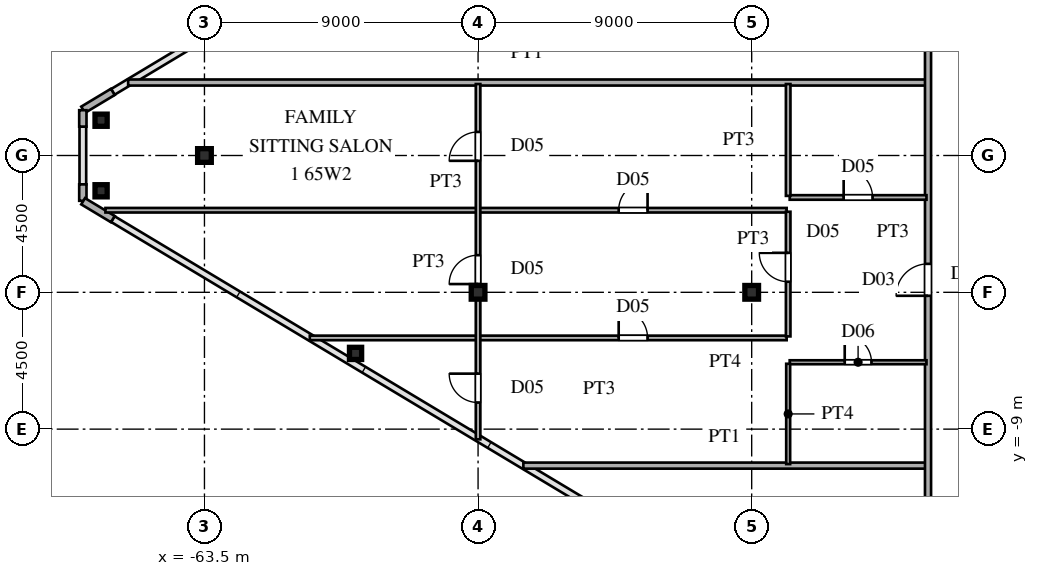
"""IFC4 building model, lengths in metres.
Left out: names, types, materials, properties, quantities, classifications, styles, units other than length and angle.
Written with IfcOpenShell. Run it as: python <this file> out.ifc"""

import sys

from ifc_helpers import new_model, si_unit, direction, frame, frame_2d, origin, origin_2d, place, context, subcontext, project, spatial, rectangle, hollow_rectangle, i_section, extrude, source, transform, mapped, element, fill, save


model = new_model("IFC4")
c1 = context("Model", 3, precision=1e-05, world=origin(), true_north=direction((0.0, 1.0)))
c2 = subcontext(c1, "Body", "Model", "MODEL_VIEW")
j1 = project(units=[si_unit("LENGTHUNIT", "METRE"), si_unit("PLANEANGLEUNIT", "RADIAN")], contexts=[c1])
p1 = place(None, origin())
s1 = spatial("IfcSite", under=j1, at=p1, CompositionType="ELEMENT")
p2 = place(p1, origin())
s2 = spatial("IfcBuilding", under=s1, at=p2, CompositionType="ELEMENT")
p3 = place(p2, frame((0.0, 0.0, 246.9)))
s3 = spatial("IfcBuildingStorey", under=s2, at=p3, CompositionType="ELEMENT", Elevation=246.9)
m1 = source(origin(), c2, "Body", "SweptSolid", [
    extrude(i_section(OverallWidth=0.45, OverallDepth=0.45, WebThickness=0.016, FlangeThickness=0.025, at=origin_2d()), origin(), (0.0, 0.0, 1.0), 3.75),
])
for number, where, z_axis, x_axis in (
    (1, (-45.5, -4.5, 0.0), (0.0, 0.0, 1.0), (1.0, 0.0, 0.0)),
    (2, (-54.5, -4.5, 0.0), (0.0, 0.0, 1.0), (1.0, 0.0, 0.0)),
    (3, (-63.5, 0.0, 0.0), (0.0, 0.0, 1.0), (1.0, 0.0, 0.0)),
):
    element("IfcColumn", number, at=place(p3, frame(where, z_axis=z_axis, x_axis=x_axis)), inside=s3, PredefinedType="COLUMN", context=c2, shape_type="MappedRepresentation", body=[
        mapped(m1, transform((0.0, 0.0, 0.0), scale=1.0)),
    ])
m2 = source(origin(), c2, "Body", "SweptSolid", [
    extrude(hollow_rectangle(XDim=0.4, YDim=0.4, WallThickness=0.016, at=origin_2d()), origin(), (0.0, 0.0, 1.0), 3.75),
])
for number, where, z_axis, x_axis in (
    (4, (-66.9, 1.16, 0.0), (0.0, 0.0, 1.0), (1.0, 0.0, 0.0)),
    (5, (-66.9, -1.16, 0.0), (0.0, 0.0, 1.0), (1.0, 0.0, 0.0)),
    (6, (-58.53, -6.509, 0.0), (0.0, 0.0, 1.0), (1.0, 0.0, 0.0)),
):
    element("IfcColumn", number, at=place(p3, frame(where, z_axis=z_axis, x_axis=x_axis)), inside=s3, PredefinedType="COLUMN", context=c2, shape_type="MappedRepresentation", body=[
        mapped(m2, transform((0.0, 0.0, 0.0), scale=1.0)),
    ])
p4 = place(p3, frame((-66.514, 2.092, 0.0), z_axis=(0.0, 0.0, 1.0), x_axis=(-0.85743623509, -0.514590228002, 0.0)))
e7 = element("IfcWall", 7, at=p4, inside=s3, PredefinedType="SOLIDWALL", context=c2, shape_type="SweptSolid", body=[
    extrude(rectangle(XDim=1.14, YDim=0.24, at=frame_2d((0.57, 0.0))), origin(), (0.0, 0.0, 1.0), 3.53),
])
for number, where, z_axis, x_axis in (
    (8, (-67.5, 1.49, 0.0), (0.0, 0.0, 1.0), (0.0, -1.0, 0.0)),
    (9, (-67.5, -0.95, 0.0), (0.0, 0.0, 1.0), (0.0, -1.0, 0.0)),
):
    element("IfcWall", number, at=place(p3, frame(where, z_axis=z_axis, x_axis=x_axis)), inside=s3, PredefinedType="SOLIDWALL", context=c2, shape_type="SweptSolid", body=[
        extrude(rectangle(XDim=0.54, YDim=0.24, at=frame_2d((0.27, 0.0))), origin(), (0.0, 0.0, 1.0), 3.53),
    ])
p5 = place(p3, frame((-67.491, -1.505, 0.0), z_axis=(0.0, 0.0, 1.0), x_axis=(0.85743623509, -0.514590228002, 0.0)))
e10 = element("IfcWall", 10, at=p5, inside=s3, PredefinedType="SOLIDWALL", context=c2, shape_type="SweptSolid", body=[
    extrude(rectangle(XDim=1.14, YDim=0.24, at=frame_2d((0.57, 0.0))), origin(), (0.0, 0.0, 1.0), 3.53),
])
p6 = place(p3, frame((-53.01, -10.2, 0.0), z_axis=(0.0, 0.0, 1.0), x_axis=(1.0, 0.0, 0.0)))
e11 = element("IfcWall", 11, at=p6, inside=s3, PredefinedType="PARTITIONING", context=c2, shape_type="SweptSolid", body=[
    extrude(rectangle(XDim=13.23, YDim=0.2, at=frame_2d((6.615, 0.0))), origin(), (0.0, 0.0, 1.0), 3.53),
])
p7 = place(p3, frame((-44.25, -6.8, 0.0), z_axis=(0.0, 0.0, 1.0), x_axis=(1.0, 0.0, 0.0)))
e12 = element("IfcWall", 12, at=p7, inside=s3, PredefinedType="PARTITIONING", context=c2, shape_type="SweptSolid", body=[
    extrude(rectangle(XDim=4.5, YDim=0.13, at=frame_2d((2.25, 0.0))), origin(), (0.0, 0.0, 1.0), 3.53),
])
p8 = place(p7, frame((1.81, 0.0, 0.0)))
e13 = element("IfcOpeningElement", 13, at=p8, cuts=e12, PredefinedType="OPENING", context=c2, shape_type="SweptSolid", body=[
    extrude(rectangle(XDim=0.88, YDim=2.1, at=frame_2d((0.44, 1.05))), frame((0.0, 0.075, 0.0), z_axis=(0.0, -1.0, 0.0), x_axis=(1.0, 0.0, 0.0)), (0.0, 0.0, 1.0), 0.15),
])
p9 = place(p3, frame((-60.035, -6.0, 0.0), z_axis=(0.0, 0.0, 1.0), x_axis=(1.0, 0.0, 0.0)))
e14 = element("IfcWall", 14, at=p9, inside=s3, PredefinedType="PARTITIONING", context=c2, shape_type="SweptSolid", body=[
    extrude(rectangle(XDim=15.685, YDim=0.15, at=frame_2d((7.842, 0.0))), origin(), (0.0, 0.0, 1.0), 3.53),
])
p10 = place(p9, frame((10.16, 0.0, 0.0)))
e15 = element("IfcOpeningElement", 15, at=p10, cuts=e14, PredefinedType="OPENING", context=c2, shape_type="SweptSolid", body=[
    extrude(rectangle(XDim=0.95, YDim=2.15, at=frame_2d((0.475, 1.075))), frame((0.0, 0.085, 0.0), z_axis=(0.0, -1.0, 0.0), x_axis=(1.0, 0.0, 0.0)), (0.0, 0.0, 1.0), 0.17),
])
p11 = place(p3, frame((-66.757, -1.8, 0.0), z_axis=(0.0, 0.0, 1.0), x_axis=(1.0, 0.0, 0.0)))
e16 = element("IfcWall", 16, at=p11, inside=s3, PredefinedType="PARTITIONING", context=c2, shape_type="SweptSolid", body=[
    extrude(rectangle(XDim=22.407, YDim=0.15, at=frame_2d((11.204, 0.0))), origin(), (0.0, 0.0, 1.0), 3.53),
])
p12 = place(p11, frame((16.882, 0.0, 0.0)))
e17 = element("IfcOpeningElement", 17, at=p12, cuts=e16, PredefinedType="OPENING", context=c2, shape_type="SweptSolid", body=[
    extrude(rectangle(XDim=0.95, YDim=2.15, at=frame_2d((0.475, 1.075))), frame((0.0, 0.085, 0.0), z_axis=(0.0, -1.0, 0.0), x_axis=(1.0, 0.0, 0.0)), (0.0, 0.0, 1.0), 0.17),
])
p13 = place(p3, frame((-44.25, -1.38, 0.0), z_axis=(0.0, 0.0, 1.0), x_axis=(1.0, 0.0, 0.0)))
e18 = element("IfcWall", 18, at=p13, inside=s3, PredefinedType="PARTITIONING", context=c2, shape_type="SweptSolid", body=[
    extrude(rectangle(XDim=4.5, YDim=0.15, at=frame_2d((2.25, 0.0))), origin(), (0.0, 0.0, 1.0), 3.53),
])
p14 = place(p13, frame((1.775, 0.0, 0.0)))
e19 = element("IfcOpeningElement", 19, at=p14, cuts=e18, PredefinedType="OPENING", context=c2, shape_type="SweptSolid", body=[
    extrude(rectangle(XDim=0.95, YDim=2.15, at=frame_2d((0.475, 1.075))), frame((0.0, 0.085, 0.0), z_axis=(0.0, -1.0, 0.0), x_axis=(1.0, 0.0, 0.0)), (0.0, 0.0, 1.0), 0.17),
])
p15 = place(p3, frame((-66.01, 2.4, 0.0), z_axis=(0.0, 0.0, 1.0), x_axis=(1.0, 0.0, 0.0)))
e20 = element("IfcWall", 20, at=p15, inside=s3, PredefinedType="PARTITIONING", context=c2, shape_type="SweptSolid", body=[
    extrude(rectangle(XDim=26.23, YDim=0.2, at=frame_2d((13.115, 0.0))), origin(), (0.0, 0.0, 1.0), 3.53),
])
p16 = place(p3, frame((-54.5, -9.335, 0.0), z_axis=(0.0, 0.0, 1.0), x_axis=(0.0, 1.0, 0.0)))
e21 = element("IfcWall", 21, at=p16, inside=s3, PredefinedType="PARTITIONING", context=c2, shape_type="SweptSolid", body=[
    extrude(rectangle(XDim=11.685, YDim=0.15, at=frame_2d((5.843, 0.0))), origin(), (0.0, 0.0, 1.0), 2.93),
])
p17 = place(p16, frame((5.107, 0.0, 0.0)))
e22 = element("IfcOpeningElement", 22, at=p17, cuts=e21, PredefinedType="OPENING", context=c2, shape_type="SweptSolid", body=[
    extrude(rectangle(XDim=0.95, YDim=2.15, at=frame_2d((0.475, 1.075))), frame((0.0, 0.085, 0.0), z_axis=(0.0, -1.0, 0.0), x_axis=(1.0, 0.0, 0.0)), (0.0, 0.0, 1.0), 0.17),
])
p18 = place(p16, frame((1.21, 0.0, 0.0)))
e23 = element("IfcOpeningElement", 23, at=p18, cuts=e21, PredefinedType="OPENING", context=c2, shape_type="SweptSolid", body=[
    extrude(rectangle(XDim=0.95, YDim=2.15, at=frame_2d((0.475, 1.075))), frame((0.0, 0.085, 0.0), z_axis=(0.0, -1.0, 0.0), x_axis=(1.0, 0.0, 0.0)), (0.0, 0.0, 1.0), 0.17),
])
p19 = place(p16, frame((9.16, 0.0, 0.0)))
e24 = element("IfcOpeningElement", 24, at=p19, cuts=e21, PredefinedType="OPENING", context=c2, shape_type="SweptSolid", body=[
    extrude(rectangle(XDim=0.95, YDim=2.15, at=frame_2d((0.475, 1.075))), frame((0.0, 0.085, 0.0), z_axis=(0.0, -1.0, 0.0), x_axis=(1.0, 0.0, 0.0)), (0.0, 0.0, 1.0), 0.17),
])
p20 = place(p3, frame((-44.3, -10.15, 0.0), z_axis=(0.0, 0.0, 1.0), x_axis=(0.0, 1.0, 0.0)))
e25 = element("IfcWall", 25, at=p20, inside=s3, PredefinedType="PARTITIONING", context=c2, shape_type="SweptSolid", body=[
    extrude(rectangle(XDim=3.3, YDim=0.13, at=frame_2d((1.65, 0.0))), origin(), (0.0, 0.0, 1.0), 3.53),
])
p21 = place(p3, frame((-44.3, -5.95, 0.0), z_axis=(0.0, 0.0, 1.0), x_axis=(0.0, 1.0, 0.0)))
e26 = element("IfcWall", 26, at=p21, inside=s3, PredefinedType="PARTITIONING", context=c2, shape_type="SweptSolid", body=[
    extrude(rectangle(XDim=4.1, YDim=0.15, at=frame_2d((2.05, 0.0))), origin(), (0.0, 0.0, 1.0), 3.53),
])
p22 = place(p21, frame((1.798, 0.0, 0.0)))
e27 = element("IfcOpeningElement", 27, at=p22, cuts=e26, PredefinedType="OPENING", context=c2, shape_type="SweptSolid", body=[
    extrude(rectangle(XDim=0.95, YDim=2.15, at=frame_2d((0.475, 1.075))), frame((0.0, 0.085, 0.0), z_axis=(0.0, -1.0, 0.0), x_axis=(1.0, 0.0, 0.0)), (0.0, 0.0, 1.0), 0.17),
])
p23 = place(p3, frame((-44.3, -1.328, 0.0), z_axis=(0.0, 0.0, 1.0), x_axis=(0.0, 1.0, 0.0)))
e28 = element("IfcWall", 28, at=p23, inside=s3, PredefinedType="PARTITIONING", context=c2, shape_type="SweptSolid", body=[
    extrude(rectangle(XDim=3.678, YDim=0.15, at=frame_2d((1.839, 0.0))), origin(), (0.0, 0.0, 1.0), 3.53),
])
p24 = place(p3, frame((-39.7, -15.515, 0.0), z_axis=(0.0, 0.0, 1.0), x_axis=(0.0, 1.0, 0.0)))
e29 = element("IfcWall", 29, at=p24, inside=s3, PredefinedType="PARTITIONING", context=c2, shape_type="SweptSolid", body=[
    extrude(rectangle(XDim=31.03, YDim=0.2, at=frame_2d((15.515, 0.0))), origin(), (0.0, 0.0, 1.0), 3.53),
])
p25 = place(p24, frame((2.09, 0.0, 0.0)))
e30 = element("IfcOpeningElement", 30, at=p25, cuts=e29, PredefinedType="OPENING", context=c2, shape_type="SweptSolid", body=[
    extrude(rectangle(XDim=1.05, YDim=2.25, at=frame_2d((0.525, 1.125))), frame((0.0, 0.11, 0.0), z_axis=(0.0, -1.0, 0.0), x_axis=(1.0, 0.0, 0.0)), (0.0, 0.0, 1.0), 0.22),
])
p26 = place(p24, frame((10.901, 0.0, 0.0)))
e31 = element("IfcOpeningElement", 31, at=p26, cuts=e29, PredefinedType="OPENING", context=c2, shape_type="SweptSolid", body=[
    extrude(rectangle(XDim=1.05, YDim=2.25, at=frame_2d((0.525, 1.125))), frame((0.0, 0.11, 0.0), z_axis=(0.0, -1.0, 0.0), x_axis=(1.0, 0.0, 0.0)), (0.0, 0.0, 1.0), 0.22),
])
p27 = place(p24, frame((23.99, 0.0, 0.0)))
e32 = element("IfcOpeningElement", 32, at=p27, cuts=e29, PredefinedType="OPENING", context=c2, shape_type="SweptSolid", body=[
    extrude(rectangle(XDim=1.05, YDim=2.25, at=frame_2d((0.525, 1.125))), frame((0.0, 0.11, 0.0), z_axis=(0.0, -1.0, 0.0), x_axis=(1.0, 0.0, 0.0)), (0.0, 0.0, 1.0), 0.22),
])
m3 = source(origin(), c2, "Body", "SweptSolid", [
    extrude(rectangle(XDim=0.88, YDim=2.1, at=frame_2d((0.44, 1.05))), frame((0.0, 0.025, 0.0), z_axis=(0.0, -1.0, 0.0), x_axis=(1.0, 0.0, 0.0)), (0.0, 0.0, 1.0), 0.05),
])
p28 = place(p8, origin())
e33 = element("IfcDoor", 33, at=p28, inside=s3, OperationType="SINGLE_SWING_LEFT", PredefinedType="DOOR", context=c2, shape_type="MappedRepresentation", body=[
    mapped(m3, transform((0.0, 0.0, 0.0), scale=1.0)),
])
fill(e13, e33)
m4 = source(origin(), c2, "Body", "SweptSolid", [
    extrude(rectangle(XDim=0.95, YDim=2.15, at=frame_2d((0.475, 1.075))), frame((0.0, 0.025, 0.0), z_axis=(0.0, -1.0, 0.0), x_axis=(1.0, 0.0, 0.0)), (0.0, 0.0, 1.0), 0.05),
])
p29 = place(p10, origin())
e34 = element("IfcDoor", 34, at=p29, inside=s3, OperationType="SINGLE_SWING_LEFT", PredefinedType="DOOR", context=c2, shape_type="MappedRepresentation", body=[
    mapped(m4, transform((0.0, 0.0, 0.0), scale=1.0)),
])
fill(e15, e34)
p30 = place(p12, origin())
e35 = element("IfcDoor", 35, at=p30, inside=s3, OperationType="SINGLE_SWING_RIGHT", PredefinedType="DOOR", context=c2, shape_type="MappedRepresentation", body=[
    mapped(m4, transform((0.0, 0.0, 0.0), scale=1.0)),
])
fill(e17, e35)
p31 = place(p14, origin())
e36 = element("IfcDoor", 36, at=p31, inside=s3, OperationType="SINGLE_SWING_LEFT", PredefinedType="DOOR", context=c2, shape_type="MappedRepresentation", body=[
    mapped(m4, transform((0.0, 0.0, 0.0), scale=1.0)),
])
fill(e19, e36)
p32 = place(p17, origin())
e37 = element("IfcDoor", 37, at=p32, inside=s3, OperationType="SINGLE_SWING_LEFT", PredefinedType="DOOR", context=c2, shape_type="MappedRepresentation", body=[
    mapped(m4, transform((0.0, 0.0, 0.0), scale=1.0)),
])
fill(e22, e37)
p33 = place(p18, origin())
e38 = element("IfcDoor", 38, at=p33, inside=s3, OperationType="SINGLE_SWING_RIGHT", PredefinedType="DOOR", context=c2, shape_type="MappedRepresentation", body=[
    mapped(m4, transform((0.0, 0.0, 0.0), scale=1.0)),
])
fill(e23, e38)
p34 = place(p19, origin())
e39 = element("IfcDoor", 39, at=p34, inside=s3, OperationType="SINGLE_SWING_LEFT", PredefinedType="DOOR", context=c2, shape_type="MappedRepresentation", body=[
    mapped(m4, transform((0.0, 0.0, 0.0), scale=1.0)),
])
fill(e24, e39)
p35 = place(p22, origin())
e40 = element("IfcDoor", 40, at=p35, inside=s3, OperationType="SINGLE_SWING_RIGHT", PredefinedType="DOOR", context=c2, shape_type="MappedRepresentation", body=[
    mapped(m4, transform((0.0, 0.0, 0.0), scale=1.0)),
])
fill(e27, e40)
m5 = source(origin(), c2, "Body", "SweptSolid", [
    extrude(rectangle(XDim=1.05, YDim=2.25, at=frame_2d((0.525, 1.125))), frame((0.0, 0.025, 0.0), z_axis=(0.0, -1.0, 0.0), x_axis=(1.0, 0.0, 0.0)), (0.0, 0.0, 1.0), 0.05),
])
p36 = place(p26, origin())
e41 = element("IfcDoor", 41, at=p36, inside=s3, OperationType="SINGLE_SWING_LEFT", PredefinedType="DOOR", context=c2, shape_type="MappedRepresentation", body=[
    mapped(m5, transform((0.0, 0.0, 0.0), scale=1.0)),
])
fill(e31, e41)
save(model, sys.argv[1])
